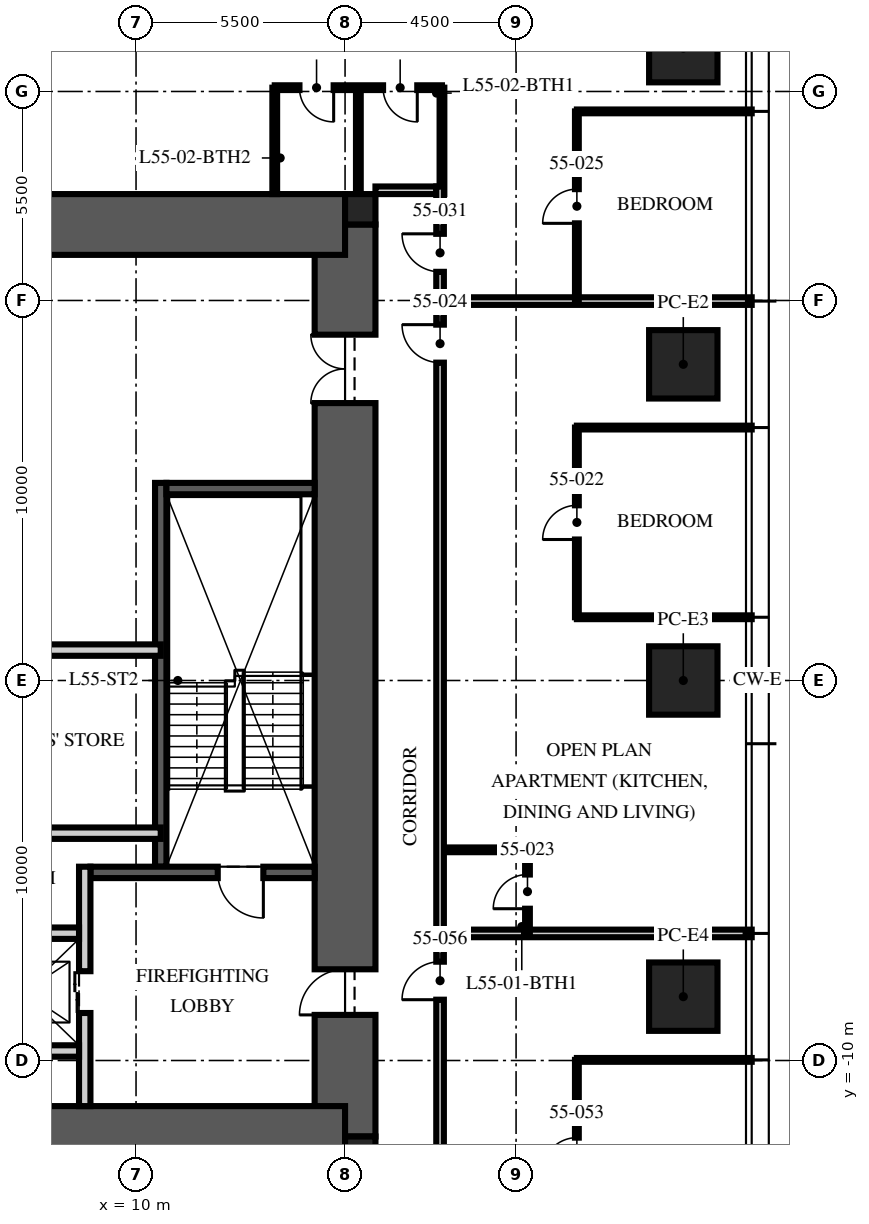
"""IFC4 building model, lengths in metres.
Left out: names, types, materials, properties, quantities, classifications, styles, units other than length and angle.
Written with IfcOpenShell. Run it as: python <this file> out.ifc"""

import sys

from ifc_helpers import new_model, si_unit, direction, frame, frame_2d, origin, origin_2d, place, context, subcontext, project, spatial, rectangle, extrude, element, fill, save


model = new_model("IFC4")
c1 = context("Model", 3, precision=1e-05, world=origin(), true_north=direction((0.0, 1.0)))
c2 = subcontext(c1, "Body", "Model", "MODEL_VIEW")
j1 = project(units=[si_unit("LENGTHUNIT", "METRE"), si_unit("PLANEANGLEUNIT", "RADIAN")], contexts=[c1])
p1 = place(None, origin())
s1 = spatial("IfcSite", under=j1, at=p1, CompositionType="ELEMENT")
p2 = place(p1, origin())
s2 = spatial("IfcBuilding", under=s1, at=p2, CompositionType="ELEMENT")
p3 = place(p2, frame((0.0, 0.0, 222.0)))
s3 = spatial("IfcBuildingStorey", under=s2, at=p3, CompositionType="ELEMENT", Elevation=222.0)
p4 = place(p3, frame((15.5, -12.0, -0.25), z_axis=(0.0, 0.0, 1.0), x_axis=(0.0, 1.0, 0.0)))
e1 = element("IfcWall", 1, at=p4, inside=s3, PredefinedType="SHEAR", context=c2, shape_type="SweptSolid", body=[
    extrude(rectangle(XDim=24.0, YDim=1.6, at=frame_2d((12.0, 0.0))), origin(), (0.0, 0.0, 1.0), 3.75),
])
p5 = place(p4, frame((3.2, 0.0, 0.25)))
e2 = element("IfcOpeningElement", 2, at=p5, cuts=e1, PredefinedType="OPENING", context=c2, shape_type="SweptSolid", body=[
    extrude(rectangle(XDim=1.2, YDim=2.1, at=frame_2d((0.6, 1.05))), frame((0.0, 0.81, 0.0), z_axis=(0.0, -1.0, 0.0), x_axis=(1.0, 0.0, 0.0)), (0.0, 0.0, 1.0), 1.62),
])
p6 = place(p4, frame((19.3, 0.0, 0.25)))
e3 = element("IfcOpeningElement", 3, at=p6, cuts=e1, PredefinedType="OPENING", context=c2, shape_type="SweptSolid", body=[
    extrude(rectangle(XDim=1.8, YDim=2.1, at=frame_2d((0.9, 1.05))), frame((0.0, 0.81, 0.0), z_axis=(0.0, -1.0, 0.0), x_axis=(1.0, 0.0, 0.0)), (0.0, 0.0, 1.0), 1.62),
])
for number, where, z_axis, x_axis in (
    (4, (-15.5, 12.0, -0.25), (0.0, 0.0, 1.0), (1.0, 0.0, 0.0)),
    (5, (-15.5, -12.0, -0.25), (0.0, 0.0, 1.0), (1.0, 0.0, 0.0)),
):
    element("IfcWall", number, at=place(p3, frame(where, z_axis=z_axis, x_axis=x_axis)), inside=s3, PredefinedType="SHEAR", context=c2, shape_type="SweptSolid", body=[
        extrude(rectangle(XDim=31.0, YDim=1.6, at=frame_2d((15.5, 0.0))), origin(), (0.0, 0.0, 1.0), 3.75),
    ])
for number, where, z_axis, x_axis in (
    (6, (15.9, 12.4, -0.25), (0.0, 0.0, 1.0), (1.0, 0.0, 0.0)),
    (7, (15.9, -12.4, -0.25), (0.0, 0.0, 1.0), (1.0, 0.0, 0.0)),
):
    element("IfcColumn", number, at=place(p3, frame(where, z_axis=z_axis, x_axis=x_axis)), inside=s3, PredefinedType="COLUMN", context=c2, shape_type="SweptSolid", body=[
        extrude(rectangle(XDim=0.8, YDim=0.8, at=origin_2d()), origin(), (0.0, 0.0, 1.0), 3.75),
    ])
for number, where, z_axis, x_axis in (
    (8, (24.4, 16.64, 0.0), (0.0, 0.0, 1.0), (0.0, 1.0, 0.0)),
    (9, (24.4, 8.32, 0.0), (0.0, 0.0, 1.0), (0.0, 1.0, 0.0)),
    (10, (24.4, 0.0, 0.0), (0.0, 0.0, 1.0), (0.0, 1.0, 0.0)),
    (11, (24.4, -8.32, 0.0), (0.0, 0.0, 1.0), (0.0, 1.0, 0.0)),
):
    element("IfcColumn", number, at=place(p3, frame(where, z_axis=z_axis, x_axis=x_axis)), inside=s3, PredefinedType="COLUMN", context=c2, shape_type="SweptSolid", body=[
        extrude(rectangle(XDim=1.8, YDim=1.8, at=origin_2d()), origin(), (0.0, 0.0, 1.0), 3.75),
    ])
p7 = place(p3, frame((10.65, -4.9, 0.0), z_axis=(0.0, 0.0, 1.0), x_axis=(0.0, 1.0, 0.0)))
e12 = element("IfcWall", 12, at=p7, inside=s3, PredefinedType="SOLIDWALL", context=c2, shape_type="SweptSolid", body=[
    extrude(rectangle(XDim=10.1, YDim=0.3, at=frame_2d((5.05, 0.0))), origin(), (0.0, 0.0, 1.0), 3.5),
])
p8 = place(p3, frame((14.7, -5.05, 0.0), z_axis=(0.0, 0.0, 1.0), x_axis=(-1.0, 0.0, 0.0)))
e13 = element("IfcWall", 13, at=p8, inside=s3, PredefinedType="SOLIDWALL", context=c2, shape_type="SweptSolid", body=[
    extrude(rectangle(XDim=5.9, YDim=0.3, at=frame_2d((2.95, 0.0))), origin(), (0.0, 0.0, 1.0), 3.5),
])
p9 = place(p8, frame((1.35, 0.0, 0.0)))
e14 = element("IfcOpeningElement", 14, at=p9, cuts=e13, PredefinedType="OPENING", context=c2, shape_type="SweptSolid", body=[
    extrude(rectangle(XDim=1.2, YDim=2.1, at=frame_2d((0.6, 1.05))), frame((0.0, 0.16, 0.0), z_axis=(0.0, -1.0, 0.0), x_axis=(1.0, 0.0, 0.0)), (0.0, 0.0, 1.0), 0.32),
])
p10 = place(p3, frame((14.7, 5.05, 0.0), z_axis=(0.0, 0.0, 1.0), x_axis=(-1.0, 0.0, 0.0)))
e15 = element("IfcWall", 15, at=p10, inside=s3, PredefinedType="SOLIDWALL", context=c2, shape_type="SweptSolid", body=[
    extrude(rectangle(XDim=3.9, YDim=0.3, at=frame_2d((1.95, 0.0))), origin(), (0.0, 0.0, 1.0), 3.5),
])
p11 = place(p3, frame((8.65, -11.2, 0.0), z_axis=(0.0, 0.0, 1.0), x_axis=(0.0, 1.0, 0.0)))
e16 = element("IfcWall", 16, at=p11, inside=s3, PredefinedType="PARTITIONING", context=c2, shape_type="SweptSolid", body=[
    extrude(rectangle(XDim=6.3, YDim=0.3, at=frame_2d((3.15, 0.0))), origin(), (0.0, 0.0, 1.0), 3.5),
])
p12 = place(p11, frame((2.45, 0.0, 0.0)))
e17 = element("IfcOpeningElement", 17, at=p12, cuts=e16, PredefinedType="OPENING", context=c2, shape_type="SweptSolid", body=[
    extrude(rectangle(XDim=1.1, YDim=2.1, at=frame_2d((0.55, 1.05))), frame((0.0, 0.16, 0.0), z_axis=(0.0, -1.0, 0.0), x_axis=(1.0, 0.0, 0.0)), (0.0, 0.0, 1.0), 0.32),
])
p13 = place(p3, frame((-8.5, -6.65, 0.0), z_axis=(0.0, 0.0, 1.0), x_axis=(1.0, 0.0, 0.0)))
e18 = element("IfcWall", 18, at=p13, inside=s3, PredefinedType="PARTITIONING", context=c2, shape_type="SweptSolid", body=[
    extrude(rectangle(XDim=17.0, YDim=0.3, at=frame_2d((8.5, 0.0))), origin(), (0.0, 0.0, 1.0), 3.5),
])
p14 = place(p13, frame((7.8, 0.0, 0.0)))
e19 = element("IfcOpeningElement", 19, at=p14, cuts=e18, PredefinedType="OPENING", context=c2, shape_type="SweptSolid", body=[
    extrude(rectangle(XDim=1.3, YDim=2.4, at=frame_2d((0.65, 1.2))), frame((0.0, 0.16, 0.0), z_axis=(0.0, -1.0, 0.0), x_axis=(1.0, 0.0, 0.0)), (0.0, 0.0, 1.0), 0.32),
])
p15 = place(p13, frame((5.65, 0.0, 0.0)))
e20 = element("IfcOpeningElement", 20, at=p15, cuts=e18, PredefinedType="OPENING", context=c2, shape_type="SweptSolid", body=[
    extrude(rectangle(XDim=0.9, YDim=2.1, at=frame_2d((0.45, 1.05))), frame((0.0, 0.16, 0.0), z_axis=(0.0, -1.0, 0.0), x_axis=(1.0, 0.0, 0.0)), (0.0, 0.0, 1.0), 0.32),
])
p16 = place(p13, frame((10.4, 0.0, 0.0)))
e21 = element("IfcOpeningElement", 21, at=p16, cuts=e18, PredefinedType="OPENING", context=c2, shape_type="SweptSolid", body=[
    extrude(rectangle(XDim=0.9, YDim=2.1, at=frame_2d((0.45, 1.05))), frame((0.0, 0.16, 0.0), z_axis=(0.0, -1.0, 0.0), x_axis=(1.0, 0.0, 0.0)), (0.0, 0.0, 1.0), 0.32),
])
p17 = place(p3, frame((5.6, -9.75, 0.0), z_axis=(0.0, 0.0, 1.0), x_axis=(1.0, 0.0, 0.0)))
e22 = element("IfcWall", 22, at=p17, inside=s3, PredefinedType="PARTITIONING", context=c2, shape_type="SweptSolid", body=[
    extrude(rectangle(XDim=2.9, YDim=0.3, at=frame_2d((1.45, 0.0))), origin(), (0.0, 0.0, 1.0), 3.5),
])
p18 = place(p3, frame((-10.65, 0.8, 0.0), z_axis=(0.0, 0.0, 1.0), x_axis=(1.0, 0.0, 0.0)))
e23 = element("IfcWall", 23, at=p18, inside=s3, PredefinedType="PARTITIONING", context=c2, shape_type="SweptSolid", body=[
    extrude(rectangle(XDim=21.3, YDim=0.3, at=frame_2d((10.65, 0.0))), origin(), (0.0, 0.0, 1.0), 3.5),
])
p19 = place(p18, frame((10.05, 0.0, 0.0)))
e24 = element("IfcOpeningElement", 24, at=p19, cuts=e23, PredefinedType="OPENING", context=c2, shape_type="SweptSolid", body=[
    extrude(rectangle(XDim=1.2, YDim=2.1, at=frame_2d((0.6, 1.05))), frame((0.0, 0.16, 0.0), z_axis=(0.0, -1.0, 0.0), x_axis=(1.0, 0.0, 0.0)), (0.0, 0.0, 1.0), 0.32),
])
p20 = place(p18, frame((0.793, 0.0, 0.0)))
e25 = element("IfcOpeningElement", 25, at=p20, cuts=e23, PredefinedType="OPENING", context=c2, shape_type="SweptSolid", body=[
    extrude(rectangle(XDim=0.9, YDim=2.1, at=frame_2d((0.45, 1.05))), frame((0.0, 0.16, 0.0), z_axis=(0.0, -1.0, 0.0), x_axis=(1.0, 0.0, 0.0)), (0.0, 0.0, 1.0), 0.32),
])
p21 = place(p3, frame((10.65, -4.018, 0.0), z_axis=(0.0, 0.0, 1.0), x_axis=(-1.0, 0.0, 0.0)))
e26 = element("IfcWall", 26, at=p21, inside=s3, PredefinedType="PARTITIONING", context=c2, shape_type="SweptSolid", body=[
    extrude(rectangle(XDim=6.45, YDim=0.3, at=frame_2d((3.225, 0.0))), origin(), (0.0, 0.0, 1.0), 3.5),
])
p22 = place(p3, frame((16.3, 12.9, 0.0), z_axis=(0.0, 0.0, 1.0), x_axis=(1.0, 0.0, 0.0)))
e27 = element("IfcWall", 27, at=p22, inside=s3, PredefinedType="PARTITIONING", context=c2, shape_type="SweptSolid", body=[
    extrude(rectangle(XDim=1.6, YDim=0.2, at=frame_2d((0.8, 0.0))), origin(), (0.0, 0.0, 1.0), 2.3),
])
p23 = place(p3, frame((18.1, -6.656, 0.0), z_axis=(0.0, 0.0, 1.0), x_axis=(1.0, 0.0, 0.0)))
e28 = element("IfcWall", 28, at=p23, inside=s3, PredefinedType="PARTITIONING", context=c2, shape_type="SweptSolid", body=[
    extrude(rectangle(XDim=8.1, YDim=0.2, at=frame_2d((4.05, 0.0))), origin(), (0.0, 0.0, 1.0), 2.91),
])
for number, where, z_axis, x_axis in (
    (29, (21.6, 1.664, 0.0), (0.0, 0.0, 1.0), (1.0, 0.0, 0.0)),
    (30, (21.6, 6.656, 0.0), (0.0, 0.0, 1.0), (1.0, 0.0, 0.0)),
):
    element("IfcWall", number, at=place(p3, frame(where, z_axis=z_axis, x_axis=x_axis)), inside=s3, PredefinedType="PARTITIONING", context=c2, shape_type="SweptSolid", body=[
        extrude(rectangle(XDim=4.6, YDim=0.1, at=frame_2d((2.3, 0.0))), origin(), (0.0, 0.0, 1.0), 2.91),
    ])
p24 = place(p3, frame((18.1, 9.984, 0.0), z_axis=(0.0, 0.0, 1.0), x_axis=(1.0, 0.0, 0.0)))
e31 = element("IfcWall", 31, at=p24, inside=s3, PredefinedType="PARTITIONING", context=c2, shape_type="SweptSolid", body=[
    extrude(rectangle(XDim=8.1, YDim=0.2, at=frame_2d((4.05, 0.0))), origin(), (0.0, 0.0, 1.0), 2.91),
])
for number, where, z_axis, x_axis in (
    (32, (21.6, 14.976, 0.0), (0.0, 0.0, 1.0), (1.0, 0.0, 0.0)),
    (33, (21.6, -9.984, 0.0), (0.0, 0.0, 1.0), (1.0, 0.0, 0.0)),
):
    element("IfcWall", number, at=place(p3, frame(where, z_axis=z_axis, x_axis=x_axis)), inside=s3, PredefinedType="PARTITIONING", context=c2, shape_type="SweptSolid", body=[
        extrude(rectangle(XDim=4.6, YDim=0.1, at=frame_2d((2.3, 0.0))), origin(), (0.0, 0.0, 1.0), 2.91),
    ])
p25 = place(p3, frame((21.6, 1.664, 0.0), z_axis=(0.0, 0.0, 1.0), x_axis=(0.0, 1.0, 0.0)))
e34 = element("IfcWall", 34, at=p25, inside=s3, PredefinedType="PARTITIONING", context=c2, shape_type="SweptSolid", body=[
    extrude(rectangle(XDim=4.992, YDim=0.1, at=frame_2d((2.496, 0.0))), origin(), (0.0, 0.0, 1.0), 2.81),
])
p26 = place(p25, frame((2.046, 0.0, 0.0)))
e35 = element("IfcOpeningElement", 35, at=p26, cuts=e34, PredefinedType="OPENING", context=c2, shape_type="SweptSolid", body=[
    extrude(rectangle(XDim=0.9, YDim=2.1, at=frame_2d((0.45, 1.05))), frame((0.0, 0.06, 0.0), z_axis=(0.0, -1.0, 0.0), x_axis=(1.0, 0.0, 0.0)), (0.0, 0.0, 1.0), 0.12),
])
p27 = place(p3, frame((20.3, -6.656, 0.0), z_axis=(0.0, 0.0, 1.0), x_axis=(0.0, 1.0, 0.0)))
e36 = element("IfcWall", 36, at=p27, inside=s3, PredefinedType="PARTITIONING", context=c2, shape_type="SweptSolid", body=[
    extrude(rectangle(XDim=2.2, YDim=0.125, at=frame_2d((1.1, 0.0))), origin(), (0.0, 0.0, 1.0), 3.5),
])
p28 = place(p27, frame((0.65, 0.0, 0.0)))
e37 = element("IfcOpeningElement", 37, at=p28, cuts=e36, PredefinedType="OPENING", context=c2, shape_type="SweptSolid", body=[
    extrude(rectangle(XDim=0.9, YDim=2.1, at=frame_2d((0.45, 1.05))), frame((0.0, 0.073, 0.0), z_axis=(0.0, -1.0, 0.0), x_axis=(1.0, 0.0, 0.0)), (0.0, 0.0, 1.0), 0.145),
])
p29 = place(p3, frame((18.1, -4.456, 0.0), z_axis=(0.0, 0.0, 1.0), x_axis=(1.0, 0.0, 0.0)))
e38 = element("IfcWall", 38, at=p29, inside=s3, PredefinedType="PARTITIONING", context=c2, shape_type="SweptSolid", body=[
    extrude(rectangle(XDim=2.2, YDim=0.125, at=frame_2d((1.1, 0.0))), origin(), (0.0, 0.0, 1.0), 3.5),
])
p30 = place(p3, frame((21.6, 9.984, 0.0), z_axis=(0.0, 0.0, 1.0), x_axis=(0.0, 1.0, 0.0)))
e39 = element("IfcWall", 39, at=p30, inside=s3, PredefinedType="PARTITIONING", context=c2, shape_type="SweptSolid", body=[
    extrude(rectangle(XDim=4.992, YDim=0.1, at=frame_2d((2.496, 0.0))), origin(), (0.0, 0.0, 1.0), 2.81),
])
p31 = place(p30, frame((2.046, 0.0, 0.0)))
e40 = element("IfcOpeningElement", 40, at=p31, cuts=e39, PredefinedType="OPENING", context=c2, shape_type="SweptSolid", body=[
    extrude(rectangle(XDim=0.9, YDim=2.1, at=frame_2d((0.45, 1.05))), frame((0.0, 0.06, 0.0), z_axis=(0.0, -1.0, 0.0), x_axis=(1.0, 0.0, 0.0)), (0.0, 0.0, 1.0), 0.12),
])
p32 = place(p3, frame((18.05, 15.6, 0.0), z_axis=(0.0, 0.0, 1.0), x_axis=(-1.0, 0.0, 0.0)))
e41 = element("IfcWall", 41, at=p32, inside=s3, PredefinedType="PARTITIONING", context=c2, shape_type="SweptSolid", body=[
    extrude(rectangle(XDim=4.4, YDim=0.125, at=frame_2d((2.2, 0.0))), origin(), (0.0, 0.0, 1.0), 2.3),
])
p33 = place(p32, frame((0.65, 0.0, 0.0)))
e42 = element("IfcOpeningElement", 42, at=p33, cuts=e41, PredefinedType="OPENING", context=c2, shape_type="SweptSolid", body=[
    extrude(rectangle(XDim=0.9, YDim=2.1, at=frame_2d((0.45, 1.05))), frame((0.0, 0.073, 0.0), z_axis=(0.0, -1.0, 0.0), x_axis=(1.0, 0.0, 0.0)), (0.0, 0.0, 1.0), 0.145),
])
p34 = place(p32, frame((2.85, 0.0, 0.0)))
e43 = element("IfcOpeningElement", 43, at=p34, cuts=e41, PredefinedType="OPENING", context=c2, shape_type="SweptSolid", body=[
    extrude(rectangle(XDim=0.9, YDim=2.1, at=frame_2d((0.45, 1.05))), frame((0.0, 0.073, 0.0), z_axis=(0.0, -1.0, 0.0), x_axis=(1.0, 0.0, 0.0)), (0.0, 0.0, 1.0), 0.145),
])
for number, where, z_axis, x_axis in (
    (44, (18.05, 12.8, 0.0), (0.0, 0.0, 1.0), (0.0, 1.0, 0.0)),
    (45, (15.85, 12.8, 0.0), (0.0, 0.0, 1.0), (0.0, 1.0, 0.0)),
):
    element("IfcWall", number, at=place(p3, frame(where, z_axis=z_axis, x_axis=x_axis)), inside=s3, PredefinedType="PARTITIONING", context=c2, shape_type="SweptSolid", body=[
        extrude(rectangle(XDim=2.8, YDim=0.125, at=frame_2d((1.4, 0.0))), origin(), (0.0, 0.0, 1.0), 2.3),
    ])
p35 = place(p3, frame((13.65, 12.8, 0.0), z_axis=(0.0, 0.0, 1.0), x_axis=(0.0, 1.0, 0.0)))
e46 = element("IfcWall", 46, at=p35, inside=s3, PredefinedType="PARTITIONING", context=c2, shape_type="SweptSolid", body=[
    extrude(rectangle(XDim=2.8, YDim=0.125, at=frame_2d((1.4, 0.0))), origin(), (0.0, 0.0, 1.0), 3.5),
])
p36 = place(p3, frame((21.6, -14.976, 0.0), z_axis=(0.0, 0.0, 1.0), x_axis=(0.0, 1.0, 0.0)))
e47 = element("IfcWall", 47, at=p36, inside=s3, PredefinedType="PARTITIONING", context=c2, shape_type="SweptSolid", body=[
    extrude(rectangle(XDim=4.992, YDim=0.1, at=frame_2d((2.496, 0.0))), origin(), (0.0, 0.0, 1.0), 2.81),
])
p37 = place(p36, frame((2.046, 0.0, 0.0)))
e48 = element("IfcOpeningElement", 48, at=p37, cuts=e47, PredefinedType="OPENING", context=c2, shape_type="SweptSolid", body=[
    extrude(rectangle(XDim=0.9, YDim=2.1, at=frame_2d((0.45, 1.05))), frame((0.0, 0.06, 0.0), z_axis=(0.0, -1.0, 0.0), x_axis=(1.0, 0.0, 0.0)), (0.0, 0.0, 1.0), 0.12),
])
p38 = place(p3, frame((18.0, -12.8, 0.0), z_axis=(0.0, 0.0, 1.0), x_axis=(0.0, 1.0, 0.0)))
e49 = element("IfcWall", 49, at=p38, inside=s3, PredefinedType="PARTITIONING", context=c2, shape_type="SweptSolid", body=[
    extrude(rectangle(XDim=25.8, YDim=0.2, at=frame_2d((12.9, 0.0))), origin(), (0.0, 0.0, 1.0), 2.6),
])
p39 = place(p38, frame((21.164, 0.0, 0.0)))
e50 = element("IfcOpeningElement", 50, at=p39, cuts=e49, PredefinedType="OPENING", context=c2, shape_type="SweptSolid", body=[
    extrude(rectangle(XDim=1.0, YDim=2.2, at=frame_2d((0.5, 1.1))), frame((0.0, 0.11, 0.0), z_axis=(0.0, -1.0, 0.0), x_axis=(1.0, 0.0, 0.0)), (0.0, 0.0, 1.0), 0.22),
])
p40 = place(p38, frame((23.554, 0.0, 0.0)))
e51 = element("IfcOpeningElement", 51, at=p40, cuts=e49, PredefinedType="OPENING", context=c2, shape_type="SweptSolid", body=[
    extrude(rectangle(XDim=1.0, YDim=2.2, at=frame_2d((0.5, 1.1))), frame((0.0, 0.11, 0.0), z_axis=(0.0, -1.0, 0.0), x_axis=(1.0, 0.0, 0.0)), (0.0, 0.0, 1.0), 0.22),
])
p41 = place(p38, frame((4.4, 0.0, 0.0)))
e52 = element("IfcOpeningElement", 52, at=p41, cuts=e49, PredefinedType="OPENING", context=c2, shape_type="SweptSolid", body=[
    extrude(rectangle(XDim=1.0, YDim=2.2, at=frame_2d((0.5, 1.1))), frame((0.0, 0.11, 0.0), z_axis=(0.0, -1.0, 0.0), x_axis=(1.0, 0.0, 0.0)), (0.0, 0.0, 1.0), 0.22),
])
p42 = place(p9, origin())
e53 = element("IfcDoor", 53, at=p42, inside=s3, OperationType="SINGLE_SWING_LEFT", PredefinedType="DOOR", context=c2, shape_type="SweptSolid", body=[
    extrude(rectangle(XDim=1.2, YDim=2.1, at=frame_2d((0.6, 1.05))), frame((0.0, 0.025, 0.0), z_axis=(0.0, -1.0, 0.0), x_axis=(1.0, 0.0, 0.0)), (0.0, 0.0, 1.0), 0.05),
])
fill(e14, e53)
p43 = place(p5, origin())
e54 = element("IfcDoor", 54, at=p43, inside=s3, OperationType="SINGLE_SWING_LEFT", PredefinedType="DOOR", context=c2, shape_type="SweptSolid", body=[
    extrude(rectangle(XDim=1.2, YDim=2.1, at=frame_2d((0.6, 1.05))), frame((0.0, 0.025, 0.0), z_axis=(0.0, -1.0, 0.0), x_axis=(1.0, 0.0, 0.0)), (0.0, 0.0, 1.0), 0.05),
])
fill(e2, e54)
p44 = place(p6, origin())
e55 = element("IfcDoor", 55, at=p44, inside=s3, OperationType="DOUBLE_DOOR_SINGLE_SWING", PredefinedType="DOOR", context=c2, shape_type="SweptSolid", body=[
    extrude(rectangle(XDim=1.8, YDim=2.1, at=frame_2d((0.9, 1.05))), frame((0.0, 0.025, 0.0), z_axis=(0.0, -1.0, 0.0), x_axis=(1.0, 0.0, 0.0)), (0.0, 0.0, 1.0), 0.05),
])
fill(e3, e55)
p45 = place(p12, origin())
e56 = element("IfcDoor", 56, at=p45, inside=s3, OperationType="DOUBLE_DOOR_SLIDING", PredefinedType="DOOR", context=c2, shape_type="SweptSolid", body=[
    extrude(rectangle(XDim=1.1, YDim=2.1, at=frame_2d((0.55, 1.05))), frame((0.0, 0.025, 0.0), z_axis=(0.0, -1.0, 0.0), x_axis=(1.0, 0.0, 0.0)), (0.0, 0.0, 1.0), 0.05),
])
fill(e17, e56)
p46 = place(p26, origin())
e57 = element("IfcDoor", 57, at=p46, inside=s3, OperationType="SINGLE_SWING_LEFT", PredefinedType="DOOR", context=c2, shape_type="SweptSolid", body=[
    extrude(rectangle(XDim=0.9, YDim=2.1, at=frame_2d((0.45, 1.05))), frame((0.0, 0.025, 0.0), z_axis=(0.0, -1.0, 0.0), x_axis=(1.0, 0.0, 0.0)), (0.0, 0.0, 1.0), 0.05),
])
fill(e35, e57)
p47 = place(p28, origin())
e58 = element("IfcDoor", 58, at=p47, inside=s3, OperationType="SINGLE_SWING_LEFT", PredefinedType="DOOR", context=c2, shape_type="SweptSolid", body=[
    extrude(rectangle(XDim=0.9, YDim=2.1, at=frame_2d((0.45, 1.05))), frame((0.0, 0.025, 0.0), z_axis=(0.0, -1.0, 0.0), x_axis=(1.0, 0.0, 0.0)), (0.0, 0.0, 1.0), 0.05),
])
fill(e37, e58)
p48 = place(p39, origin())
e59 = element("IfcDoor", 59, at=p48, inside=s3, OperationType="SINGLE_SWING_RIGHT", PredefinedType="DOOR", context=c2, shape_type="SweptSolid", body=[
    extrude(rectangle(XDim=1.0, YDim=2.2, at=frame_2d((0.5, 1.1))), frame((0.0, 0.025, 0.0), z_axis=(0.0, -1.0, 0.0), x_axis=(1.0, 0.0, 0.0)), (0.0, 0.0, 1.0), 0.05),
])
fill(e50, e59)
p49 = place(p31, origin())
e60 = element("IfcDoor", 60, at=p49, inside=s3, OperationType="SINGLE_SWING_LEFT", PredefinedType="DOOR", context=c2, shape_type="SweptSolid", body=[
    extrude(rectangle(XDim=0.9, YDim=2.1, at=frame_2d((0.45, 1.05))), frame((0.0, 0.025, 0.0), z_axis=(0.0, -1.0, 0.0), x_axis=(1.0, 0.0, 0.0)), (0.0, 0.0, 1.0), 0.05),
])
fill(e40, e60)
p50 = place(p33, origin())
e61 = element("IfcDoor", 61, at=p50, inside=s3, OperationType="SINGLE_SWING_LEFT", PredefinedType="DOOR", context=c2, shape_type="SweptSolid", body=[
    extrude(rectangle(XDim=0.9, YDim=2.1, at=frame_2d((0.45, 1.05))), frame((0.0, 0.025, 0.0), z_axis=(0.0, -1.0, 0.0), x_axis=(1.0, 0.0, 0.0)), (0.0, 0.0, 1.0), 0.05),
])
fill(e42, e61)
p51 = place(p34, origin())
e62 = element("IfcDoor", 62, at=p51, inside=s3, OperationType="SINGLE_SWING_LEFT", PredefinedType="DOOR", context=c2, shape_type="SweptSolid", body=[
    extrude(rectangle(XDim=0.9, YDim=2.1, at=frame_2d((0.45, 1.05))), frame((0.0, 0.025, 0.0), z_axis=(0.0, -1.0, 0.0), x_axis=(1.0, 0.0, 0.0)), (0.0, 0.0, 1.0), 0.05),
])
fill(e43, e62)
p52 = place(p40, origin())
e63 = element("IfcDoor", 63, at=p52, inside=s3, OperationType="SINGLE_SWING_RIGHT", PredefinedType="DOOR", context=c2, shape_type="SweptSolid", body=[
    extrude(rectangle(XDim=1.0, YDim=2.2, at=frame_2d((0.5, 1.1))), frame((0.0, 0.025, 0.0), z_axis=(0.0, -1.0, 0.0), x_axis=(1.0, 0.0, 0.0)), (0.0, 0.0, 1.0), 0.05),
])
fill(e51, e63)
p53 = place(p37, origin())
e64 = element("IfcDoor", 64, at=p53, inside=s3, OperationType="SINGLE_SWING_LEFT", PredefinedType="DOOR", context=c2, shape_type="SweptSolid", body=[
    extrude(rectangle(XDim=0.9, YDim=2.1, at=frame_2d((0.45, 1.05))), frame((0.0, 0.025, 0.0), z_axis=(0.0, -1.0, 0.0), x_axis=(1.0, 0.0, 0.0)), (0.0, 0.0, 1.0), 0.05),
])
fill(e48, e64)
p54 = place(p41, origin())
e65 = element("IfcDoor", 65, at=p54, inside=s3, OperationType="SINGLE_SWING_LEFT", PredefinedType="DOOR", context=c2, shape_type="SweptSolid", body=[
    extrude(rectangle(XDim=1.0, YDim=2.2, at=frame_2d((0.5, 1.1))), frame((0.0, 0.025, 0.0), z_axis=(0.0, -1.0, 0.0), x_axis=(1.0, 0.0, 0.0)), (0.0, 0.0, 1.0), 0.05),
])
fill(e52, e65)
save(model, sys.argv[1])
